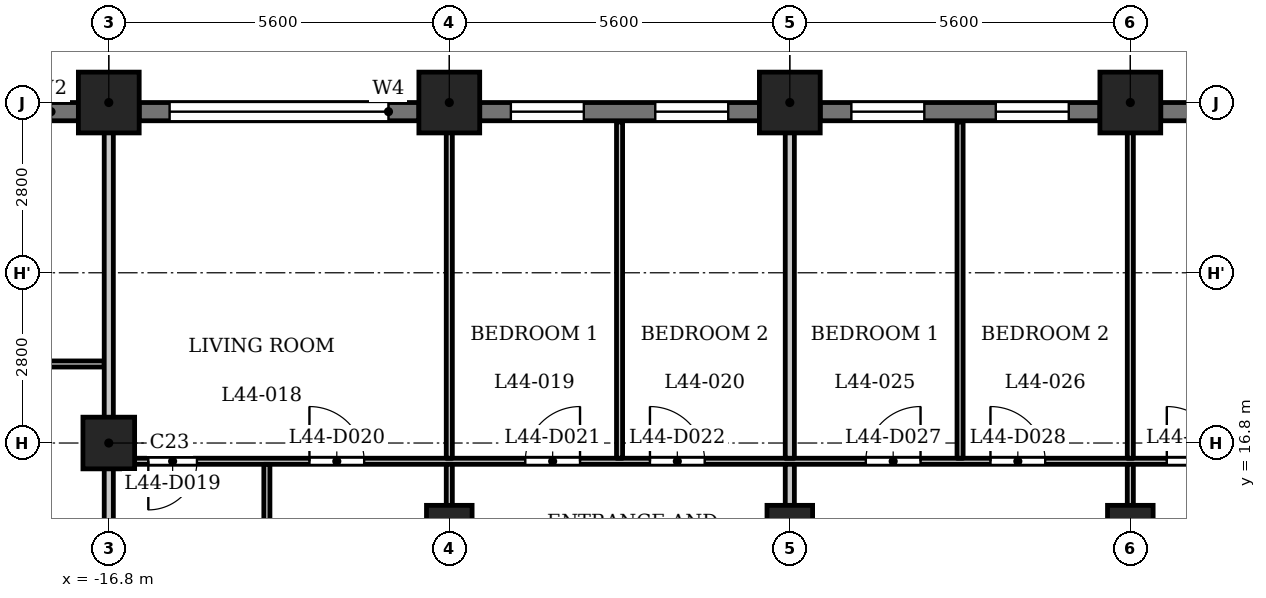
"""IFC4 building model, lengths in metres.
Left out: names, types, materials, properties, quantities, classifications, styles, units other than length and angle.
Written with IfcOpenShell. Run it as: python <this file> out.ifc"""

import sys

from ifc_helpers import new_model, si_unit, direction, frame, frame_2d, origin, origin_2d, place, context, subcontext, project, spatial, rectangle, extrude, element, fill, save


model = new_model("IFC4")
c1 = context("Model", 3, precision=1e-05, world=origin(), true_north=direction((0.0, 1.0)))
c2 = subcontext(c1, "Body", "Model", "MODEL_VIEW")
j1 = project(units=[si_unit("LENGTHUNIT", "METRE"), si_unit("PLANEANGLEUNIT", "RADIAN")], contexts=[c1])
p1 = place(None, origin())
s1 = spatial("IfcSite", under=j1, at=p1, CompositionType="ELEMENT")
p2 = place(p1, origin())
s2 = spatial("IfcBuilding", under=s1, at=p2, CompositionType="ELEMENT")
p3 = place(p2, frame((0.0, 0.0, 171.1)))
s3 = spatial("IfcBuildingStorey", under=s2, at=p3, CompositionType="ELEMENT", Elevation=171.1)
for number, where, z_axis, x_axis in (
    (1, (0.0, 22.4, 0.0), (0.0, 0.0, 1.0), (1.0, 0.0, 0.0)),
    (2, (-5.6, 22.4, 0.0), (0.0, 0.0, 1.0), (1.0, 0.0, 0.0)),
    (3, (-11.2, 22.4, 0.0), (0.0, 0.0, 1.0), (1.0, 0.0, 0.0)),
    (4, (-16.8, 22.4, 0.0), (0.0, 0.0, 1.0), (1.0, 0.0, 0.0)),
):
    element("IfcColumn", number, at=place(p3, frame(where, z_axis=z_axis, x_axis=x_axis)), inside=s3, PredefinedType="COLUMN", context=c2, shape_type="SweptSolid", body=[
        extrude(rectangle(XDim=1.0, YDim=1.0, at=origin_2d()), origin(), (0.0, 0.0, 1.0), 3.5),
    ])
p4 = place(p3, frame((-16.8, 16.8, 0.0), z_axis=(0.0, 0.0, 1.0), x_axis=(1.0, 0.0, 0.0)))
e5 = element("IfcColumn", 5, at=p4, inside=s3, PredefinedType="COLUMN", context=c2, shape_type="SweptSolid", body=[
    extrude(rectangle(XDim=0.85, YDim=0.85, at=origin_2d()), origin(), (0.0, 0.0, 1.0), 3.5),
])
for number, where, z_axis, x_axis in (
    (6, (-11.2, 15.4, 0.0), (0.0, 0.0, 1.0), (1.0, 0.0, 0.0)),
    (7, (-5.6, 15.4, 0.0), (0.0, 0.0, 1.0), (1.0, 0.0, 0.0)),
    (8, (0.0, 15.4, 0.0), (0.0, 0.0, 1.0), (1.0, 0.0, 0.0)),
):
    element("IfcColumn", number, at=place(p3, frame(where, z_axis=z_axis, x_axis=x_axis)), inside=s3, PredefinedType="COLUMN", context=c2, shape_type="SweptSolid", body=[
        extrude(rectangle(XDim=0.75, YDim=0.75, at=origin_2d()), origin(), (0.0, 0.0, 1.0), 3.5),
    ])
p5 = place(p3, frame((5.1, 22.25, 0.0), z_axis=(0.0, 0.0, 1.0), x_axis=(-1.0, 0.0, 0.0)))
e9 = element("IfcWall", 9, at=p5, inside=s3, PredefinedType="SOLIDWALL", context=c2, shape_type="SweptSolid", body=[
    extrude(rectangle(XDim=4.6, YDim=0.3, at=frame_2d((2.3, 0.0))), origin(), (0.0, 0.0, 1.0), 2.45),
])
p6 = place(p5, frame((0.5, 0.0, 1.2)))
e10 = element("IfcOpeningElement", 10, at=p6, cuts=e9, PredefinedType="OPENING", context=c2, shape_type="SweptSolid", body=[
    extrude(rectangle(XDim=3.6, YDim=0.95, at=frame_2d((1.8, 0.475))), frame((0.0, 0.16, 0.0), z_axis=(0.0, -1.0, 0.0), x_axis=(1.0, 0.0, 0.0)), (0.0, 0.0, 1.0), 0.32),
])
p7 = place(p3, frame((-0.5, 22.25, 0.0), z_axis=(0.0, 0.0, 1.0), x_axis=(-1.0, 0.0, 0.0)))
e11 = element("IfcWall", 11, at=p7, inside=s3, PredefinedType="SOLIDWALL", context=c2, shape_type="SweptSolid", body=[
    extrude(rectangle(XDim=4.6, YDim=0.3, at=frame_2d((2.3, 0.0))), origin(), (0.0, 0.0, 1.0), 2.45),
])
p8 = place(p7, frame((0.512, 0.0, 0.6)))
e12 = element("IfcOpeningElement", 12, at=p8, cuts=e11, PredefinedType="OPENING", context=c2, shape_type="SweptSolid", body=[
    extrude(rectangle(XDim=1.2, YDim=1.55, at=frame_2d((0.6, 0.775))), frame((0.0, 0.16, 0.0), z_axis=(0.0, -1.0, 0.0), x_axis=(1.0, 0.0, 0.0)), (0.0, 0.0, 1.0), 0.32),
])
p9 = place(p7, frame((2.887, 0.0, 0.6)))
e13 = element("IfcOpeningElement", 13, at=p9, cuts=e11, PredefinedType="OPENING", context=c2, shape_type="SweptSolid", body=[
    extrude(rectangle(XDim=1.2, YDim=1.55, at=frame_2d((0.6, 0.775))), frame((0.0, 0.16, 0.0), z_axis=(0.0, -1.0, 0.0), x_axis=(1.0, 0.0, 0.0)), (0.0, 0.0, 1.0), 0.32),
])
p10 = place(p3, frame((-6.1, 22.25, 0.0), z_axis=(0.0, 0.0, 1.0), x_axis=(-1.0, 0.0, 0.0)))
e14 = element("IfcWall", 14, at=p10, inside=s3, PredefinedType="SOLIDWALL", context=c2, shape_type="SweptSolid", body=[
    extrude(rectangle(XDim=4.6, YDim=0.3, at=frame_2d((2.3, 0.0))), origin(), (0.0, 0.0, 1.0), 2.45),
])
p11 = place(p10, frame((0.512, 0.0, 0.6)))
e15 = element("IfcOpeningElement", 15, at=p11, cuts=e14, PredefinedType="OPENING", context=c2, shape_type="SweptSolid", body=[
    extrude(rectangle(XDim=1.2, YDim=1.55, at=frame_2d((0.6, 0.775))), frame((0.0, 0.16, 0.0), z_axis=(0.0, -1.0, 0.0), x_axis=(1.0, 0.0, 0.0)), (0.0, 0.0, 1.0), 0.32),
])
p12 = place(p10, frame((2.887, 0.0, 0.6)))
e16 = element("IfcOpeningElement", 16, at=p12, cuts=e14, PredefinedType="OPENING", context=c2, shape_type="SweptSolid", body=[
    extrude(rectangle(XDim=1.2, YDim=1.55, at=frame_2d((0.6, 0.775))), frame((0.0, 0.16, 0.0), z_axis=(0.0, -1.0, 0.0), x_axis=(1.0, 0.0, 0.0)), (0.0, 0.0, 1.0), 0.32),
])
p13 = place(p3, frame((-11.7, 22.25, 0.0), z_axis=(0.0, 0.0, 1.0), x_axis=(-1.0, 0.0, 0.0)))
e17 = element("IfcWall", 17, at=p13, inside=s3, PredefinedType="SOLIDWALL", context=c2, shape_type="SweptSolid", body=[
    extrude(rectangle(XDim=4.6, YDim=0.3, at=frame_2d((2.3, 0.0))), origin(), (0.0, 0.0, 1.0), 2.45),
])
p14 = place(p13, frame((0.5, 0.0, 1.2)))
e18 = element("IfcOpeningElement", 18, at=p14, cuts=e17, PredefinedType="OPENING", context=c2, shape_type="SweptSolid", body=[
    extrude(rectangle(XDim=3.6, YDim=0.95, at=frame_2d((1.8, 0.475))), frame((0.0, 0.16, 0.0), z_axis=(0.0, -1.0, 0.0), x_axis=(1.0, 0.0, 0.0)), (0.0, 0.0, 1.0), 0.32),
])
p15 = place(p3, frame((-17.3, 22.25, 0.0), z_axis=(0.0, 0.0, 1.0), x_axis=(-1.0, 0.0, 0.0)))
e19 = element("IfcWall", 19, at=p15, inside=s3, PredefinedType="SOLIDWALL", context=c2, shape_type="SweptSolid", body=[
    extrude(rectangle(XDim=2.7, YDim=0.3, at=frame_2d((1.35, 0.0))), origin(), (0.0, 0.0, 1.0), 2.45),
])
p16 = place(p15, frame((0.45, 0.0, 0.9)))
e20 = element("IfcOpeningElement", 20, at=p16, cuts=e19, PredefinedType="OPENING", context=c2, shape_type="SweptSolid", body=[
    extrude(rectangle(XDim=1.8, YDim=1.25, at=frame_2d((0.9, 0.625))), frame((0.0, 0.16, 0.0), z_axis=(0.0, -1.0, 0.0), x_axis=(1.0, 0.0, 0.0)), (0.0, 0.0, 1.0), 0.32),
])
p17 = place(p3, frame((-16.725, 16.5, 0.0), z_axis=(0.0, 0.0, 1.0), x_axis=(1.0, 0.0, 0.0)))
e21 = element("IfcWall", 21, at=p17, inside=s3, PredefinedType="PARTITIONING", context=c2, shape_type="SweptSolid", body=[
    extrude(rectangle(XDim=33.45, YDim=0.1, at=frame_2d((16.725, 0.0))), origin(), (0.0, 0.0, 1.0), 3.2),
])
p18 = place(p17, frame((0.575, 0.0, 0.0)))
e22 = element("IfcOpeningElement", 22, at=p18, cuts=e21, PredefinedType="OPENING", context=c2, shape_type="SweptSolid", body=[
    extrude(rectangle(XDim=0.8, YDim=2.1, at=frame_2d((0.4, 1.05))), frame((0.0, 0.06, 0.0), z_axis=(0.0, -1.0, 0.0), x_axis=(1.0, 0.0, 0.0)), (0.0, 0.0, 1.0), 0.12),
])
p19 = place(p17, frame((3.225, 0.0, 0.0)))
e23 = element("IfcOpeningElement", 23, at=p19, cuts=e21, PredefinedType="OPENING", context=c2, shape_type="SweptSolid", body=[
    extrude(rectangle(XDim=0.9, YDim=2.1, at=frame_2d((0.45, 1.05))), frame((0.0, 0.06, 0.0), z_axis=(0.0, -1.0, 0.0), x_axis=(1.0, 0.0, 0.0)), (0.0, 0.0, 1.0), 0.12),
])
p20 = place(p17, frame((6.775, 0.0, 0.0)))
e24 = element("IfcOpeningElement", 24, at=p20, cuts=e21, PredefinedType="OPENING", context=c2, shape_type="SweptSolid", body=[
    extrude(rectangle(XDim=0.9, YDim=2.1, at=frame_2d((0.45, 1.05))), frame((0.0, 0.06, 0.0), z_axis=(0.0, -1.0, 0.0), x_axis=(1.0, 0.0, 0.0)), (0.0, 0.0, 1.0), 0.12),
])
p21 = place(p17, frame((8.825, 0.0, 0.0)))
e25 = element("IfcOpeningElement", 25, at=p21, cuts=e21, PredefinedType="OPENING", context=c2, shape_type="SweptSolid", body=[
    extrude(rectangle(XDim=0.9, YDim=2.1, at=frame_2d((0.45, 1.05))), frame((0.0, 0.06, 0.0), z_axis=(0.0, -1.0, 0.0), x_axis=(1.0, 0.0, 0.0)), (0.0, 0.0, 1.0), 0.12),
])
p22 = place(p17, frame((20.775, 0.0, 0.0)))
e26 = element("IfcOpeningElement", 26, at=p22, cuts=e21, PredefinedType="OPENING", context=c2, shape_type="SweptSolid", body=[
    extrude(rectangle(XDim=0.8, YDim=2.1, at=frame_2d((0.4, 1.05))), frame((0.0, 0.06, 0.0), z_axis=(0.0, -1.0, 0.0), x_axis=(1.0, 0.0, 0.0)), (0.0, 0.0, 1.0), 0.12),
])
p23 = place(p17, frame((17.325, 0.0, 0.0)))
e27 = element("IfcOpeningElement", 27, at=p23, cuts=e21, PredefinedType="OPENING", context=c2, shape_type="SweptSolid", body=[
    extrude(rectangle(XDim=0.9, YDim=2.1, at=frame_2d((0.45, 1.05))), frame((0.0, 0.06, 0.0), z_axis=(0.0, -1.0, 0.0), x_axis=(1.0, 0.0, 0.0)), (0.0, 0.0, 1.0), 0.12),
])
p24 = place(p17, frame((12.375, 0.0, 0.0)))
e28 = element("IfcOpeningElement", 28, at=p24, cuts=e21, PredefinedType="OPENING", context=c2, shape_type="SweptSolid", body=[
    extrude(rectangle(XDim=0.9, YDim=2.1, at=frame_2d((0.45, 1.05))), frame((0.0, 0.06, 0.0), z_axis=(0.0, -1.0, 0.0), x_axis=(1.0, 0.0, 0.0)), (0.0, 0.0, 1.0), 0.12),
])
p25 = place(p17, frame((14.425, 0.0, 0.0)))
e29 = element("IfcOpeningElement", 29, at=p25, cuts=e21, PredefinedType="OPENING", context=c2, shape_type="SweptSolid", body=[
    extrude(rectangle(XDim=0.9, YDim=2.1, at=frame_2d((0.45, 1.05))), frame((0.0, 0.06, 0.0), z_axis=(0.0, -1.0, 0.0), x_axis=(1.0, 0.0, 0.0)), (0.0, 0.0, 1.0), 0.12),
])
p26 = place(p17, frame((26.575, 0.0, 0.0)))
e30 = element("IfcOpeningElement", 30, at=p26, cuts=e21, PredefinedType="OPENING", context=c2, shape_type="SweptSolid", body=[
    extrude(rectangle(XDim=0.8, YDim=2.1, at=frame_2d((0.4, 1.05))), frame((0.0, 0.06, 0.0), z_axis=(0.0, -1.0, 0.0), x_axis=(1.0, 0.0, 0.0)), (0.0, 0.0, 1.0), 0.12),
])
p27 = place(p17, frame((23.775, 0.0, 0.0)))
e31 = element("IfcOpeningElement", 31, at=p27, cuts=e21, PredefinedType="OPENING", context=c2, shape_type="SweptSolid", body=[
    extrude(rectangle(XDim=0.9, YDim=2.1, at=frame_2d((0.45, 1.05))), frame((0.0, 0.06, 0.0), z_axis=(0.0, -1.0, 0.0), x_axis=(1.0, 0.0, 0.0)), (0.0, 0.0, 1.0), 0.12),
])
p28 = place(p17, frame((32.075, 0.0, 0.0)))
e32 = element("IfcOpeningElement", 32, at=p28, cuts=e21, PredefinedType="OPENING", context=c2, shape_type="SweptSolid", body=[
    extrude(rectangle(XDim=0.8, YDim=2.1, at=frame_2d((0.4, 1.05))), frame((0.0, 0.06, 0.0), z_axis=(0.0, -1.0, 0.0), x_axis=(1.0, 0.0, 0.0)), (0.0, 0.0, 1.0), 0.12),
])
p29 = place(p17, frame((29.375, 0.0, 0.0)))
e33 = element("IfcOpeningElement", 33, at=p29, cuts=e21, PredefinedType="OPENING", context=c2, shape_type="SweptSolid", body=[
    extrude(rectangle(XDim=0.9, YDim=2.1, at=frame_2d((0.45, 1.05))), frame((0.0, 0.06, 0.0), z_axis=(0.0, -1.0, 0.0), x_axis=(1.0, 0.0, 0.0)), (0.0, 0.0, 1.0), 0.12),
])
p30 = place(p3, frame((-26.44, 18.1, 0.0), z_axis=(0.0, 0.0, 1.0), x_axis=(1.0, 0.0, 0.0)))
e34 = element("IfcWall", 34, at=p30, inside=s3, PredefinedType="PARTITIONING", context=c2, shape_type="SweptSolid", body=[
    extrude(rectangle(XDim=9.565, YDim=0.1, at=frame_2d((4.782, 0.0))), origin(), (0.0, 0.0, 1.0), 3.2),
])
p31 = place(p30, frame((1.126, 0.0, 0.0)))
e35 = element("IfcOpeningElement", 35, at=p31, cuts=e34, PredefinedType="OPENING", context=c2, shape_type="SweptSolid", body=[
    extrude(rectangle(XDim=0.8, YDim=2.1, at=frame_2d((0.4, 1.05))), frame((0.0, 0.06, 0.0), z_axis=(0.0, -1.0, 0.0), x_axis=(1.0, 0.0, 0.0)), (0.0, 0.0, 1.0), 0.12),
])
p32 = place(p30, frame((4.59, 0.0, 0.0)))
e36 = element("IfcOpeningElement", 36, at=p32, cuts=e34, PredefinedType="OPENING", context=c2, shape_type="SweptSolid", body=[
    extrude(rectangle(XDim=0.9, YDim=2.1, at=frame_2d((0.45, 1.05))), frame((0.0, 0.06, 0.0), z_axis=(0.0, -1.0, 0.0), x_axis=(1.0, 0.0, 0.0)), (0.0, 0.0, 1.0), 0.12),
])
p33 = place(p3, frame((-16.8, 15.475, 0.0), z_axis=(0.0, 0.0, 1.0), x_axis=(0.0, 1.0, 0.0)))
e37 = element("IfcWall", 37, at=p33, inside=s3, PredefinedType="PARTITIONING", context=c2, shape_type="SweptSolid", body=[
    extrude(rectangle(XDim=7.405, YDim=0.15, at=frame_2d((3.702, 0.0))), origin(), (0.0, 0.0, 1.0), 3.2),
])
p34 = place(p3, frame((-14.2, 13.275, 0.0), z_axis=(0.0, 0.0, 1.0), x_axis=(0.0, 1.0, 0.0)))
e38 = element("IfcWall", 38, at=p34, inside=s3, PredefinedType="PARTITIONING", context=c2, shape_type="SweptSolid", body=[
    extrude(rectangle(XDim=3.175, YDim=0.1, at=frame_2d((1.587, 0.0))), origin(), (0.0, 0.0, 1.0), 3.2),
])
p35 = place(p3, frame((-11.2, 13.275, 0.0), z_axis=(0.0, 0.0, 1.0), x_axis=(0.0, 1.0, 0.0)))
e39 = element("IfcWall", 39, at=p35, inside=s3, PredefinedType="PARTITIONING", context=c2, shape_type="SweptSolid", body=[
    extrude(rectangle(XDim=3.175, YDim=0.1, at=frame_2d((1.587, 0.0))), origin(), (0.0, 0.0, 1.0), 3.2),
])
p36 = place(p35, frame((0.425, 0.0, 0.0)))
e40 = element("IfcOpeningElement", 40, at=p36, cuts=e39, PredefinedType="OPENING", context=c2, shape_type="SweptSolid", body=[
    extrude(rectangle(XDim=0.9, YDim=2.1, at=frame_2d((0.45, 1.05))), frame((0.0, 0.06, 0.0), z_axis=(0.0, -1.0, 0.0), x_axis=(1.0, 0.0, 0.0)), (0.0, 0.0, 1.0), 0.12),
])
p37 = place(p3, frame((-11.2, 16.55, 0.0), z_axis=(0.0, 0.0, 1.0), x_axis=(0.0, 1.0, 0.0)))
e41 = element("IfcWall", 41, at=p37, inside=s3, PredefinedType="PARTITIONING", context=c2, shape_type="SweptSolid", body=[
    extrude(rectangle(XDim=6.33, YDim=0.1, at=frame_2d((3.165, 0.0))), origin(), (0.0, 0.0, 1.0), 3.2),
])
p38 = place(p3, frame((-8.4, 16.55, 0.0), z_axis=(0.0, 0.0, 1.0), x_axis=(0.0, 1.0, 0.0)))
e42 = element("IfcWall", 42, at=p38, inside=s3, PredefinedType="PARTITIONING", context=c2, shape_type="SweptSolid", body=[
    extrude(rectangle(XDim=5.53, YDim=0.1, at=frame_2d((2.765, 0.0))), origin(), (0.0, 0.0, 1.0), 3.2),
])
p39 = place(p3, frame((-5.6, 13.275, 0.0), z_axis=(0.0, 0.0, 1.0), x_axis=(0.0, 1.0, 0.0)))
e43 = element("IfcWall", 43, at=p39, inside=s3, PredefinedType="PARTITIONING", context=c2, shape_type="SweptSolid", body=[
    extrude(rectangle(XDim=3.175, YDim=0.15, at=frame_2d((1.587, 0.0))), origin(), (0.0, 0.0, 1.0), 3.2),
])
p40 = place(p3, frame((-5.6, 16.55, 0.0), z_axis=(0.0, 0.0, 1.0), x_axis=(0.0, 1.0, 0.0)))
e44 = element("IfcWall", 44, at=p40, inside=s3, PredefinedType="PARTITIONING", context=c2, shape_type="SweptSolid", body=[
    extrude(rectangle(XDim=6.33, YDim=0.15, at=frame_2d((3.165, 0.0))), origin(), (0.0, 0.0, 1.0), 3.2),
])
p41 = place(p3, frame((-2.8, 16.55, 0.0), z_axis=(0.0, 0.0, 1.0), x_axis=(0.0, 1.0, 0.0)))
e45 = element("IfcWall", 45, at=p41, inside=s3, PredefinedType="PARTITIONING", context=c2, shape_type="SweptSolid", body=[
    extrude(rectangle(XDim=5.53, YDim=0.1, at=frame_2d((2.765, 0.0))), origin(), (0.0, 0.0, 1.0), 3.2),
])
p42 = place(p3, frame((0.0, 13.275, 0.0), z_axis=(0.0, 0.0, 1.0), x_axis=(0.0, 1.0, 0.0)))
e46 = element("IfcWall", 46, at=p42, inside=s3, PredefinedType="PARTITIONING", context=c2, shape_type="SweptSolid", body=[
    extrude(rectangle(XDim=3.175, YDim=0.1, at=frame_2d((1.587, 0.0))), origin(), (0.0, 0.0, 1.0), 3.2),
])
p43 = place(p42, frame((0.576, 0.0, 0.0)))
e47 = element("IfcOpeningElement", 47, at=p43, cuts=e46, PredefinedType="OPENING", context=c2, shape_type="SweptSolid", body=[
    extrude(rectangle(XDim=0.9, YDim=2.1, at=frame_2d((0.45, 1.05))), frame((0.0, 0.06, 0.0), z_axis=(0.0, -1.0, 0.0), x_axis=(1.0, 0.0, 0.0)), (0.0, 0.0, 1.0), 0.12),
])
p44 = place(p3, frame((0.0, 16.55, 0.0), z_axis=(0.0, 0.0, 1.0), x_axis=(0.0, 1.0, 0.0)))
e48 = element("IfcWall", 48, at=p44, inside=s3, PredefinedType="PARTITIONING", context=c2, shape_type="SweptSolid", body=[
    extrude(rectangle(XDim=6.33, YDim=0.1, at=frame_2d((3.165, 0.0))), origin(), (0.0, 0.0, 1.0), 3.2),
])
p45 = place(p18, origin())
e49 = element("IfcDoor", 49, at=p45, inside=s3, OperationType="SINGLE_SWING_LEFT", PredefinedType="DOOR", context=c2, shape_type="SweptSolid", body=[
    extrude(rectangle(XDim=0.8, YDim=2.1, at=frame_2d((0.4, 1.05))), frame((0.0, 0.025, 0.0), z_axis=(0.0, -1.0, 0.0), x_axis=(1.0, 0.0, 0.0)), (0.0, 0.0, 1.0), 0.05),
])
fill(e22, e49)
p46 = place(p19, origin())
e50 = element("IfcDoor", 50, at=p46, inside=s3, OperationType="SINGLE_SWING_RIGHT", PredefinedType="DOOR", context=c2, shape_type="SweptSolid", body=[
    extrude(rectangle(XDim=0.9, YDim=2.1, at=frame_2d((0.45, 1.05))), frame((0.0, 0.025, 0.0), z_axis=(0.0, -1.0, 0.0), x_axis=(1.0, 0.0, 0.0)), (0.0, 0.0, 1.0), 0.05),
])
fill(e23, e50)
p47 = place(p20, origin())
e51 = element("IfcDoor", 51, at=p47, inside=s3, OperationType="SINGLE_SWING_LEFT", PredefinedType="DOOR", context=c2, shape_type="SweptSolid", body=[
    extrude(rectangle(XDim=0.9, YDim=2.1, at=frame_2d((0.45, 1.05))), frame((0.0, 0.025, 0.0), z_axis=(0.0, -1.0, 0.0), x_axis=(1.0, 0.0, 0.0)), (0.0, 0.0, 1.0), 0.05),
])
fill(e24, e51)
p48 = place(p21, origin())
e52 = element("IfcDoor", 52, at=p48, inside=s3, OperationType="SINGLE_SWING_RIGHT", PredefinedType="DOOR", context=c2, shape_type="SweptSolid", body=[
    extrude(rectangle(XDim=0.9, YDim=2.1, at=frame_2d((0.45, 1.05))), frame((0.0, 0.025, 0.0), z_axis=(0.0, -1.0, 0.0), x_axis=(1.0, 0.0, 0.0)), (0.0, 0.0, 1.0), 0.05),
])
fill(e25, e52)
p49 = place(p23, origin())
e53 = element("IfcDoor", 53, at=p49, inside=s3, OperationType="SINGLE_SWING_RIGHT", PredefinedType="DOOR", context=c2, shape_type="SweptSolid", body=[
    extrude(rectangle(XDim=0.9, YDim=2.1, at=frame_2d((0.45, 1.05))), frame((0.0, 0.025, 0.0), z_axis=(0.0, -1.0, 0.0), x_axis=(1.0, 0.0, 0.0)), (0.0, 0.0, 1.0), 0.05),
])
fill(e27, e53)
p50 = place(p24, origin())
e54 = element("IfcDoor", 54, at=p50, inside=s3, OperationType="SINGLE_SWING_LEFT", PredefinedType="DOOR", context=c2, shape_type="SweptSolid", body=[
    extrude(rectangle(XDim=0.9, YDim=2.1, at=frame_2d((0.45, 1.05))), frame((0.0, 0.025, 0.0), z_axis=(0.0, -1.0, 0.0), x_axis=(1.0, 0.0, 0.0)), (0.0, 0.0, 1.0), 0.05),
])
fill(e28, e54)
p51 = place(p25, origin())
e55 = element("IfcDoor", 55, at=p51, inside=s3, OperationType="SINGLE_SWING_RIGHT", PredefinedType="DOOR", context=c2, shape_type="SweptSolid", body=[
    extrude(rectangle(XDim=0.9, YDim=2.1, at=frame_2d((0.45, 1.05))), frame((0.0, 0.025, 0.0), z_axis=(0.0, -1.0, 0.0), x_axis=(1.0, 0.0, 0.0)), (0.0, 0.0, 1.0), 0.05),
])
fill(e29, e55)
p52 = place(p8, origin())
e56 = element("IfcWindow", 56, at=p52, inside=s3, PartitioningType="SINGLE_PANEL", PredefinedType="WINDOW", context=c2, shape_type="SweptSolid", body=[
    extrude(rectangle(XDim=1.2, YDim=1.55, at=frame_2d((0.6, 0.775))), frame((0.0, 0.03, 0.0), z_axis=(0.0, -1.0, 0.0), x_axis=(1.0, 0.0, 0.0)), (0.0, 0.0, 1.0), 0.06),
])
fill(e12, e56)
p53 = place(p9, origin())
e57 = element("IfcWindow", 57, at=p53, inside=s3, PartitioningType="SINGLE_PANEL", PredefinedType="WINDOW", context=c2, shape_type="SweptSolid", body=[
    extrude(rectangle(XDim=1.2, YDim=1.55, at=frame_2d((0.6, 0.775))), frame((0.0, 0.03, 0.0), z_axis=(0.0, -1.0, 0.0), x_axis=(1.0, 0.0, 0.0)), (0.0, 0.0, 1.0), 0.06),
])
fill(e13, e57)
p54 = place(p11, origin())
e58 = element("IfcWindow", 58, at=p54, inside=s3, PartitioningType="SINGLE_PANEL", PredefinedType="WINDOW", context=c2, shape_type="SweptSolid", body=[
    extrude(rectangle(XDim=1.2, YDim=1.55, at=frame_2d((0.6, 0.775))), frame((0.0, 0.03, 0.0), z_axis=(0.0, -1.0, 0.0), x_axis=(1.0, 0.0, 0.0)), (0.0, 0.0, 1.0), 0.06),
])
fill(e15, e58)
p55 = place(p12, origin())
e59 = element("IfcWindow", 59, at=p55, inside=s3, PartitioningType="SINGLE_PANEL", PredefinedType="WINDOW", context=c2, shape_type="SweptSolid", body=[
    extrude(rectangle(XDim=1.2, YDim=1.55, at=frame_2d((0.6, 0.775))), frame((0.0, 0.03, 0.0), z_axis=(0.0, -1.0, 0.0), x_axis=(1.0, 0.0, 0.0)), (0.0, 0.0, 1.0), 0.06),
])
fill(e16, e59)
p56 = place(p14, origin())
e60 = element("IfcWindow", 60, at=p56, inside=s3, PartitioningType="SINGLE_PANEL", PredefinedType="WINDOW", context=c2, shape_type="SweptSolid", body=[
    extrude(rectangle(XDim=3.6, YDim=0.95, at=frame_2d((1.8, 0.475))), frame((0.0, 0.03, 0.0), z_axis=(0.0, -1.0, 0.0), x_axis=(1.0, 0.0, 0.0)), (0.0, 0.0, 1.0), 0.06),
])
fill(e18, e60)
save(model, sys.argv[1])
